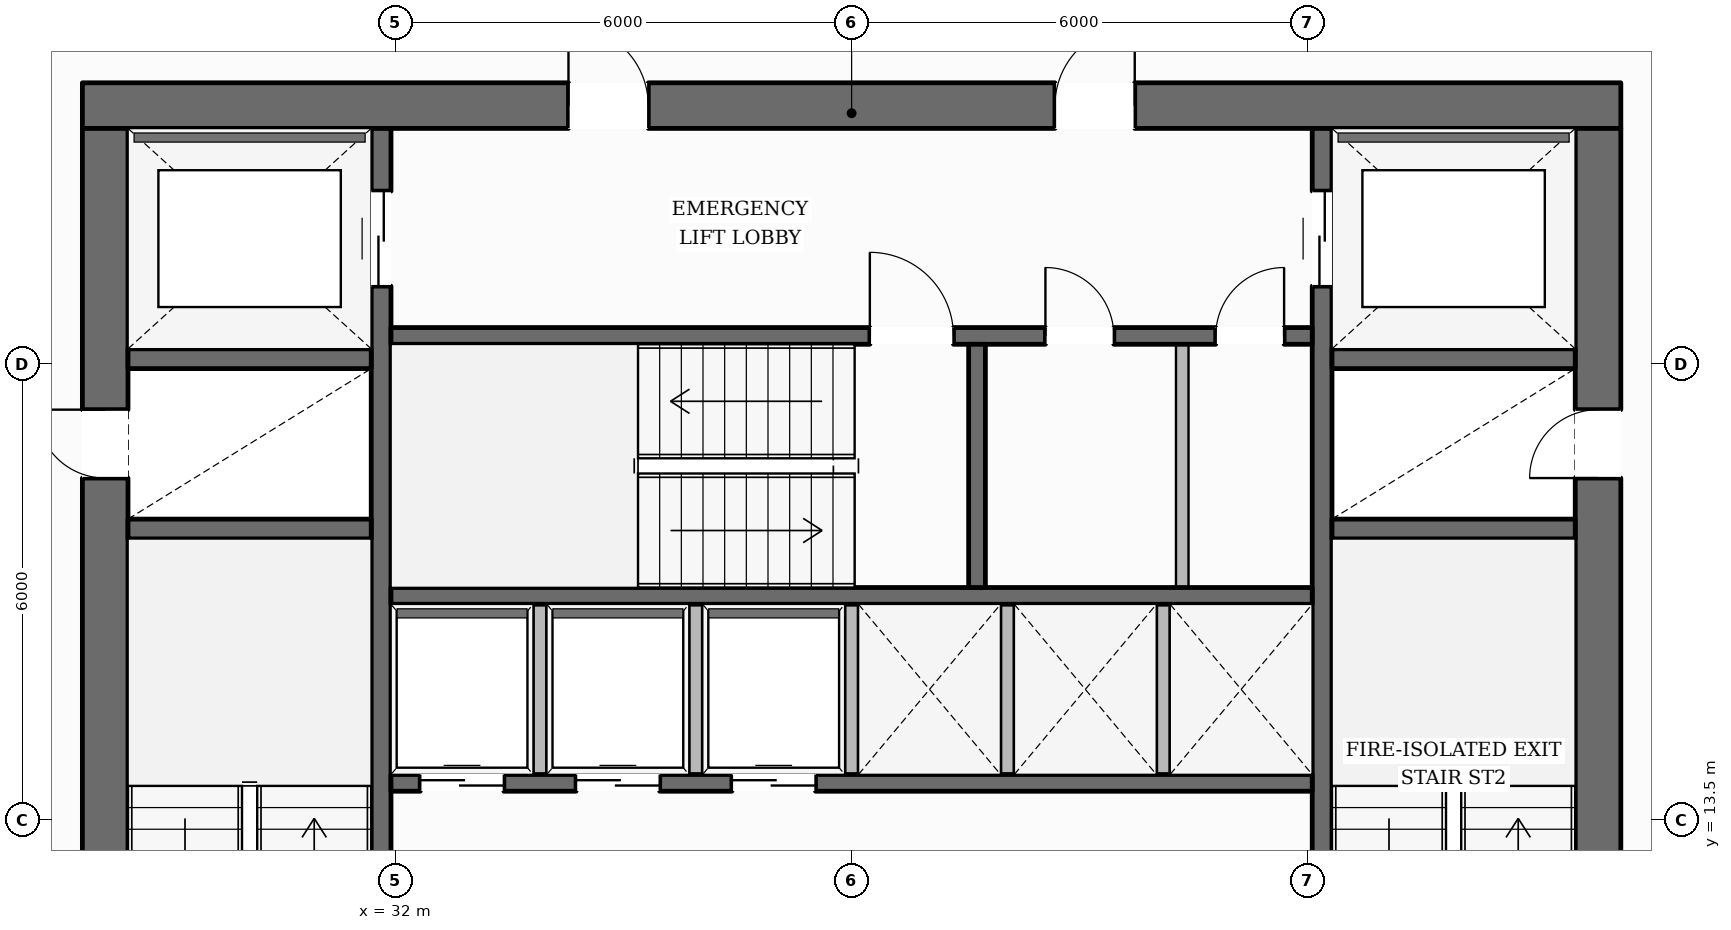
"""IFC4 building model, lengths in metres.
Left out: names, types, materials, properties, quantities, classifications, styles, units other than length and angle.
Written with IfcOpenShell. Run it as: python <this file> out.ifc"""

import sys

from ifc_helpers import new_model, si_unit, direction, frame, frame_2d, origin, place, context, subcontext, project, spatial, rectangle, extrude, element, fill, save


model = new_model("IFC4")
c1 = context("Model", 3, precision=1e-05, world=origin(), true_north=direction((0.0, 1.0)))
c2 = subcontext(c1, "Body", "Model", "MODEL_VIEW")
j1 = project(units=[si_unit("LENGTHUNIT", "METRE"), si_unit("PLANEANGLEUNIT", "RADIAN")], contexts=[c1])
p1 = place(None, origin())
s1 = spatial("IfcSite", under=j1, at=p1, CompositionType="ELEMENT")
p2 = place(p1, origin())
s2 = spatial("IfcBuilding", under=s1, at=p2, CompositionType="ELEMENT")
p3 = place(p2, frame((0.0, 0.0, 52.2)))
s3 = spatial("IfcBuildingStorey", under=s2, at=p3, CompositionType="ELEMENT", Elevation=52.2)
p4 = place(p3, frame((27.88, 22.9, 0.0), z_axis=(0.0, 0.0, 1.0), x_axis=(1.0, 0.0, 0.0)))
e1 = element("IfcWall", 1, at=p4, inside=s3, PredefinedType="SOLIDWALL", context=c2, shape_type="SweptSolid", body=[
    extrude(rectangle(XDim=20.24, YDim=0.6, at=frame_2d((10.12, 0.0))), origin(), (0.0, 0.0, 1.0), 3.59),
])
p5 = place(p4, frame((6.395, 0.0, 0.0)))
e2 = element("IfcOpeningElement", 2, at=p5, cuts=e1, PredefinedType="OPENING", context=c2, shape_type="SweptSolid", body=[
    extrude(rectangle(XDim=1.05, YDim=2.15, at=frame_2d((0.525, 1.075))), frame((0.0, 0.31, 0.0), z_axis=(0.0, -1.0, 0.0), x_axis=(1.0, 0.0, 0.0)), (0.0, 0.0, 1.0), 0.62),
])
p6 = place(p4, frame((12.795, 0.0, 0.0)))
e3 = element("IfcOpeningElement", 3, at=p6, cuts=e1, PredefinedType="OPENING", context=c2, shape_type="SweptSolid", body=[
    extrude(rectangle(XDim=1.05, YDim=2.15, at=frame_2d((0.525, 1.075))), frame((0.0, 0.31, 0.0), z_axis=(0.0, -1.0, 0.0), x_axis=(1.0, 0.0, 0.0)), (0.0, 0.0, 1.0), 0.62),
])
p7 = place(p3, frame((28.18, 9.6, 0.0), z_axis=(0.0, 0.0, 1.0), x_axis=(0.0, 1.0, 0.0)))
e4 = element("IfcWall", 4, at=p7, inside=s3, PredefinedType="SOLIDWALL", context=c2, shape_type="SweptSolid", body=[
    extrude(rectangle(XDim=13.0, YDim=0.6, at=frame_2d((6.5, 0.0))), origin(), (0.0, 0.0, 1.0), 3.59),
])
p8 = place(p7, frame((0.2, 0.0, 0.0)))
e5 = element("IfcOpeningElement", 5, at=p8, cuts=e4, PredefinedType="OPENING", context=c2, shape_type="SweptSolid", body=[
    extrude(rectangle(XDim=1.1, YDim=2.15, at=frame_2d((0.55, 1.075))), frame((0.0, 0.31, 0.0), z_axis=(0.0, -1.0, 0.0), x_axis=(1.0, 0.0, 0.0)), (0.0, 0.0, 1.0), 0.62),
])
p9 = place(p7, frame((8.4, 0.0, 0.0)))
e6 = element("IfcOpeningElement", 6, at=p9, cuts=e4, PredefinedType="OPENING", context=c2, shape_type="SweptSolid", body=[
    extrude(rectangle(XDim=0.9, YDim=2.1, at=frame_2d((0.45, 1.05))), frame((0.0, 0.31, 0.0), z_axis=(0.0, -1.0, 0.0), x_axis=(1.0, 0.0, 0.0)), (0.0, 0.0, 1.0), 0.62),
])
p10 = place(p3, frame((47.82, 9.6, 0.0), z_axis=(0.0, 0.0, 1.0), x_axis=(0.0, 1.0, 0.0)))
e7 = element("IfcWall", 7, at=p10, inside=s3, PredefinedType="SOLIDWALL", context=c2, shape_type="SweptSolid", body=[
    extrude(rectangle(XDim=13.0, YDim=0.6, at=frame_2d((6.5, 0.0))), origin(), (0.0, 0.0, 1.0), 3.59),
])
p11 = place(p10, frame((0.2, 0.0, 0.0)))
e8 = element("IfcOpeningElement", 8, at=p11, cuts=e7, PredefinedType="OPENING", context=c2, shape_type="SweptSolid", body=[
    extrude(rectangle(XDim=1.1, YDim=2.15, at=frame_2d((0.55, 1.075))), frame((0.0, 0.31, 0.0), z_axis=(0.0, -1.0, 0.0), x_axis=(1.0, 0.0, 0.0)), (0.0, 0.0, 1.0), 0.62),
])
p12 = place(p10, frame((8.4, 0.0, 0.0)))
e9 = element("IfcOpeningElement", 9, at=p12, cuts=e7, PredefinedType="OPENING", context=c2, shape_type="SweptSolid", body=[
    extrude(rectangle(XDim=0.9, YDim=2.1, at=frame_2d((0.45, 1.05))), frame((0.0, 0.31, 0.0), z_axis=(0.0, -1.0, 0.0), x_axis=(1.0, 0.0, 0.0)), (0.0, 0.0, 1.0), 0.62),
])
p13 = place(p3, frame((31.81, 9.6, 0.0), z_axis=(0.0, 0.0, 1.0), x_axis=(0.0, 1.0, 0.0)))
e10 = element("IfcWall", 10, at=p13, inside=s3, PredefinedType="SHEAR", context=c2, shape_type="SweptSolid", body=[
    extrude(rectangle(XDim=13.0, YDim=0.26, at=frame_2d((6.5, 0.0))), origin(), (0.0, 0.0, 1.0), 3.59),
])
p14 = place(p13, frame((10.925, 0.0, 0.0)))
e11 = element("IfcOpeningElement", 11, at=p14, cuts=e10, PredefinedType="OPENING", context=c2, shape_type="SweptSolid", body=[
    extrude(rectangle(XDim=1.25, YDim=2.25, at=frame_2d((0.625, 1.125))), frame((0.0, 0.14, 0.0), z_axis=(0.0, -1.0, 0.0), x_axis=(1.0, 0.0, 0.0)), (0.0, 0.0, 1.0), 0.28),
])
p15 = place(p3, frame((44.19, 9.6, 0.0), z_axis=(0.0, 0.0, 1.0), x_axis=(0.0, 1.0, 0.0)))
e12 = element("IfcWall", 12, at=p15, inside=s3, PredefinedType="SHEAR", context=c2, shape_type="SweptSolid", body=[
    extrude(rectangle(XDim=13.0, YDim=0.26, at=frame_2d((6.5, 0.0))), origin(), (0.0, 0.0, 1.0), 3.59),
])
p16 = place(p15, frame((10.925, 0.0, 0.0)))
e13 = element("IfcOpeningElement", 13, at=p16, cuts=e12, PredefinedType="OPENING", context=c2, shape_type="SweptSolid", body=[
    extrude(rectangle(XDim=1.25, YDim=2.25, at=frame_2d((0.625, 1.125))), frame((0.0, 0.14, 0.0), z_axis=(0.0, -1.0, 0.0), x_axis=(1.0, 0.0, 0.0)), (0.0, 0.0, 1.0), 0.28),
])
for number, where, z_axis, x_axis in (
    (14, (28.48, 17.33, 0.0), (0.0, 0.0, 1.0), (1.0, 0.0, 0.0)),
    (15, (28.48, 19.57, 0.0), (0.0, 0.0, 1.0), (1.0, 0.0, 0.0)),
    (16, (44.32, 17.33, 0.0), (0.0, 0.0, 1.0), (1.0, 0.0, 0.0)),
    (17, (44.32, 19.57, 0.0), (0.0, 0.0, 1.0), (1.0, 0.0, 0.0)),
):
    element("IfcWall", number, at=place(p3, frame(where, z_axis=z_axis, x_axis=x_axis)), inside=s3, PredefinedType="SHEAR", context=c2, shape_type="SweptSolid", body=[
        extrude(rectangle(XDim=3.2, YDim=0.26, at=frame_2d((1.6, 0.0))), origin(), (0.0, 0.0, 1.0), 3.59),
    ])
p17 = place(p3, frame((31.94, 19.87, 0.0), z_axis=(0.0, 0.0, 1.0), x_axis=(1.0, 0.0, 0.0)))
e18 = element("IfcWall", 18, at=p17, inside=s3, PredefinedType="SOLIDWALL", context=c2, shape_type="SweptSolid", body=[
    extrude(rectangle(XDim=12.12, YDim=0.22, at=frame_2d((6.06, 0.0))), origin(), (0.0, 0.0, 1.0), 3.59),
])
p18 = place(p17, frame((6.3, 0.0, 0.0)))
e19 = element("IfcOpeningElement", 19, at=p18, cuts=e18, PredefinedType="OPENING", context=c2, shape_type="SweptSolid", body=[
    extrude(rectangle(XDim=1.1, YDim=2.15, at=frame_2d((0.55, 1.075))), frame((0.0, 0.12, 0.0), z_axis=(0.0, -1.0, 0.0), x_axis=(1.0, 0.0, 0.0)), (0.0, 0.0, 1.0), 0.24),
])
p19 = place(p17, frame((8.61, 0.0, 0.0)))
e20 = element("IfcOpeningElement", 20, at=p19, cuts=e18, PredefinedType="OPENING", context=c2, shape_type="SweptSolid", body=[
    extrude(rectangle(XDim=0.9, YDim=2.1, at=frame_2d((0.45, 1.05))), frame((0.0, 0.12, 0.0), z_axis=(0.0, -1.0, 0.0), x_axis=(1.0, 0.0, 0.0)), (0.0, 0.0, 1.0), 0.24),
])
p20 = place(p17, frame((10.85, 0.0, 0.0)))
e21 = element("IfcOpeningElement", 21, at=p20, cuts=e18, PredefinedType="OPENING", context=c2, shape_type="SweptSolid", body=[
    extrude(rectangle(XDim=0.9, YDim=2.1, at=frame_2d((0.45, 1.05))), frame((0.0, 0.12, 0.0), z_axis=(0.0, -1.0, 0.0), x_axis=(1.0, 0.0, 0.0)), (0.0, 0.0, 1.0), 0.24),
])
p21 = place(p3, frame((31.94, 16.45, 0.0), z_axis=(0.0, 0.0, 1.0), x_axis=(1.0, 0.0, 0.0)))
e22 = element("IfcWall", 22, at=p21, inside=s3, PredefinedType="SOLIDWALL", context=c2, shape_type="SweptSolid", body=[
    extrude(rectangle(XDim=12.12, YDim=0.22, at=frame_2d((6.06, 0.0))), origin(), (0.0, 0.0, 1.0), 3.59),
])
p22 = place(p3, frame((39.65, 16.56, 0.0), z_axis=(0.0, 0.0, 1.0), x_axis=(0.0, 1.0, 0.0)))
e23 = element("IfcWall", 23, at=p22, inside=s3, PredefinedType="SOLIDWALL", context=c2, shape_type="SweptSolid", body=[
    extrude(rectangle(XDim=3.2, YDim=0.22, at=frame_2d((1.6, 0.0))), origin(), (0.0, 0.0, 1.0), 3.59),
])
p23 = place(p3, frame((31.94, 13.99, 0.0), z_axis=(0.0, 0.0, 1.0), x_axis=(1.0, 0.0, 0.0)))
e24 = element("IfcWall", 24, at=p23, inside=s3, PredefinedType="SOLIDWALL", context=c2, shape_type="SweptSolid", body=[
    extrude(rectangle(XDim=12.12, YDim=0.22, at=frame_2d((6.06, 0.0))), origin(), (0.0, 0.0, 1.0), 3.59),
])
p24 = place(p23, frame((0.385, 0.0, 0.0)))
e25 = element("IfcOpeningElement", 25, at=p24, cuts=e24, PredefinedType="OPENING", context=c2, shape_type="SweptSolid", body=[
    extrude(rectangle(XDim=1.1, YDim=2.2, at=frame_2d((0.55, 1.1))), frame((0.0, 0.12, 0.0), z_axis=(0.0, -1.0, 0.0), x_axis=(1.0, 0.0, 0.0)), (0.0, 0.0, 1.0), 0.24),
])
p25 = place(p23, frame((2.435, 0.0, 0.0)))
e26 = element("IfcOpeningElement", 26, at=p25, cuts=e24, PredefinedType="OPENING", context=c2, shape_type="SweptSolid", body=[
    extrude(rectangle(XDim=1.1, YDim=2.2, at=frame_2d((0.55, 1.1))), frame((0.0, 0.12, 0.0), z_axis=(0.0, -1.0, 0.0), x_axis=(1.0, 0.0, 0.0)), (0.0, 0.0, 1.0), 0.24),
])
p26 = place(p23, frame((4.485, 0.0, 0.0)))
e27 = element("IfcOpeningElement", 27, at=p26, cuts=e24, PredefinedType="OPENING", context=c2, shape_type="SweptSolid", body=[
    extrude(rectangle(XDim=1.1, YDim=2.2, at=frame_2d((0.55, 1.1))), frame((0.0, 0.12, 0.0), z_axis=(0.0, -1.0, 0.0), x_axis=(1.0, 0.0, 0.0)), (0.0, 0.0, 1.0), 0.24),
])
p27 = place(p3, frame((13.02, 14.028, 0.0), z_axis=(0.0, 0.0, 1.0), x_axis=(0.501385664719, 0.86522391045, 0.0)))
e28 = element("IfcWall", 28, at=p27, inside=s3, PredefinedType="STANDARD", context=c2, shape_type="SweptSolid", body=[
    extrude(rectangle(XDim=35.142, YDim=0.38, at=frame_2d((17.571, 0.0))), origin(), (0.0, 0.0, 1.0), 2.97),
])
p28 = place(p27, frame((30.991, 0.0, 0.65)))
e29 = element("IfcOpeningElement", 29, at=p28, cuts=e28, PredefinedType="OPENING", context=c2, shape_type="SweptSolid", body=[
    extrude(rectangle(XDim=1.65, YDim=1.75, at=frame_2d((0.825, 0.875))), frame((0.0, 0.2, 0.0), z_axis=(0.0, -1.0, 0.0), x_axis=(1.0, 0.0, 0.0)), (0.0, 0.0, 1.0), 0.4),
])
p29 = place(p27, frame((25.293, 0.0, 0.65)))
e30 = element("IfcOpeningElement", 30, at=p29, cuts=e28, PredefinedType="OPENING", context=c2, shape_type="SweptSolid", body=[
    extrude(rectangle(XDim=1.65, YDim=1.75, at=frame_2d((0.825, 0.875))), frame((0.0, 0.2, 0.0), z_axis=(0.0, -1.0, 0.0), x_axis=(1.0, 0.0, 0.0)), (0.0, 0.0, 1.0), 0.4),
])
p30 = place(p27, frame((13.898, 0.0, 0.65)))
e31 = element("IfcOpeningElement", 31, at=p30, cuts=e28, PredefinedType="OPENING", context=c2, shape_type="SweptSolid", body=[
    extrude(rectangle(XDim=1.65, YDim=1.75, at=frame_2d((0.825, 0.875))), frame((0.0, 0.2, 0.0), z_axis=(0.0, -1.0, 0.0), x_axis=(1.0, 0.0, 0.0)), (0.0, 0.0, 1.0), 0.4),
])
p31 = place(p27, frame((8.201, 0.0, 0.65)))
e32 = element("IfcOpeningElement", 32, at=p31, cuts=e28, PredefinedType="OPENING", context=c2, shape_type="SweptSolid", body=[
    extrude(rectangle(XDim=1.65, YDim=1.75, at=frame_2d((0.825, 0.875))), frame((0.0, 0.2, 0.0), z_axis=(0.0, -1.0, 0.0), x_axis=(1.0, 0.0, 0.0)), (0.0, 0.0, 1.0), 0.4),
])
p32 = place(p27, frame((2.503, 0.0, 0.65)))
e33 = element("IfcOpeningElement", 33, at=p32, cuts=e28, PredefinedType="OPENING", context=c2, shape_type="SweptSolid", body=[
    extrude(rectangle(XDim=1.65, YDim=1.75, at=frame_2d((0.825, 0.875))), frame((0.0, 0.2, 0.0), z_axis=(0.0, -1.0, 0.0), x_axis=(1.0, 0.0, 0.0)), (0.0, 0.0, 1.0), 0.4),
])
p33 = place(p3, frame((45.475, 44.367, 0.0), z_axis=(0.0, 0.0, 1.0), x_axis=(0.505110430219, -0.863054722068, 0.0)))
e34 = element("IfcWall", 34, at=p33, inside=s3, PredefinedType="STANDARD", context=c2, shape_type="SweptSolid", body=[
    extrude(rectangle(XDim=35.405, YDim=0.38, at=frame_2d((17.703, 0.0))), origin(), (0.0, 0.0, 1.0), 2.97),
])
p34 = place(p33, frame((31.23, 0.0, 0.65)))
e35 = element("IfcOpeningElement", 35, at=p34, cuts=e34, PredefinedType="OPENING", context=c2, shape_type="SweptSolid", body=[
    extrude(rectangle(XDim=1.65, YDim=1.75, at=frame_2d((0.825, 0.875))), frame((0.0, 0.2, 0.0), z_axis=(0.0, -1.0, 0.0), x_axis=(1.0, 0.0, 0.0)), (0.0, 0.0, 1.0), 0.4),
])
p35 = place(p33, frame((25.488, 0.0, 0.65)))
e36 = element("IfcOpeningElement", 36, at=p35, cuts=e34, PredefinedType="OPENING", context=c2, shape_type="SweptSolid", body=[
    extrude(rectangle(XDim=1.65, YDim=1.75, at=frame_2d((0.825, 0.875))), frame((0.0, 0.2, 0.0), z_axis=(0.0, -1.0, 0.0), x_axis=(1.0, 0.0, 0.0)), (0.0, 0.0, 1.0), 0.4),
])
p36 = place(p33, frame((14.004, 0.0, 0.65)))
e37 = element("IfcOpeningElement", 37, at=p36, cuts=e34, PredefinedType="OPENING", context=c2, shape_type="SweptSolid", body=[
    extrude(rectangle(XDim=1.65, YDim=1.75, at=frame_2d((0.825, 0.875))), frame((0.0, 0.2, 0.0), z_axis=(0.0, -1.0, 0.0), x_axis=(1.0, 0.0, 0.0)), (0.0, 0.0, 1.0), 0.4),
])
p37 = place(p33, frame((8.262, 0.0, 0.65)))
e38 = element("IfcOpeningElement", 38, at=p37, cuts=e34, PredefinedType="OPENING", context=c2, shape_type="SweptSolid", body=[
    extrude(rectangle(XDim=1.65, YDim=1.75, at=frame_2d((0.825, 0.875))), frame((0.0, 0.2, 0.0), z_axis=(0.0, -1.0, 0.0), x_axis=(1.0, 0.0, 0.0)), (0.0, 0.0, 1.0), 0.4),
])
p38 = place(p33, frame((2.52, 0.0, 0.65)))
e39 = element("IfcOpeningElement", 39, at=p38, cuts=e34, PredefinedType="OPENING", context=c2, shape_type="SweptSolid", body=[
    extrude(rectangle(XDim=1.65, YDim=1.75, at=frame_2d((0.825, 0.875))), frame((0.0, 0.2, 0.0), z_axis=(0.0, -1.0, 0.0), x_axis=(1.0, 0.0, 0.0)), (0.0, 0.0, 1.0), 0.4),
])
for number, where, z_axis, x_axis in (
    (40, (33.9, 14.1, 0.0), (0.0, 0.0, 1.0), (0.0, 1.0, 0.0)),
    (41, (35.95, 14.1, 0.0), (0.0, 0.0, 1.0), (0.0, 1.0, 0.0)),
    (42, (38.0, 14.1, 0.0), (0.0, 0.0, 1.0), (0.0, 1.0, 0.0)),
    (43, (40.05, 14.1, 0.0), (0.0, 0.0, 1.0), (0.0, 1.0, 0.0)),
    (44, (42.1, 14.1, 0.0), (0.0, 0.0, 1.0), (0.0, 1.0, 0.0)),
):
    element("IfcWall", number, at=place(p3, frame(where, z_axis=z_axis, x_axis=x_axis)), inside=s3, PredefinedType="PARTITIONING", context=c2, shape_type="SweptSolid", body=[
        extrude(rectangle(XDim=2.24, YDim=0.165, at=frame_2d((1.12, 0.0))), origin(), (0.0, 0.0, 1.0), 3.59),
    ])
p39 = place(p3, frame((42.35, 16.56, 0.0), z_axis=(0.0, 0.0, 1.0), x_axis=(0.0, 1.0, 0.0)))
e45 = element("IfcWall", 45, at=p39, inside=s3, PredefinedType="PARTITIONING", context=c2, shape_type="SweptSolid", body=[
    extrude(rectangle(XDim=3.2, YDim=0.165, at=frame_2d((1.6, 0.0))), origin(), (0.0, 0.0, 1.0), 3.59),
])
p40 = place(p18, origin())
e46 = element("IfcDoor", 46, at=p40, inside=s3, OperationType="SINGLE_SWING_LEFT", PredefinedType="DOOR", context=c2, shape_type="SweptSolid", body=[
    extrude(rectangle(XDim=1.1, YDim=2.15, at=frame_2d((0.55, 1.075))), frame((0.0, 0.025, 0.0), z_axis=(0.0, -1.0, 0.0), x_axis=(1.0, 0.0, 0.0)), (0.0, 0.0, 1.0), 0.05),
])
fill(e19, e46)
p41 = place(p9, origin())
e47 = element("IfcDoor", 47, at=p41, inside=s3, OperationType="SINGLE_SWING_RIGHT", PredefinedType="DOOR", context=c2, shape_type="SweptSolid", body=[
    extrude(rectangle(XDim=0.9, YDim=2.1, at=frame_2d((0.45, 1.05))), frame((0.0, 0.025, 0.0), z_axis=(0.0, -1.0, 0.0), x_axis=(1.0, 0.0, 0.0)), (0.0, 0.0, 1.0), 0.05),
])
fill(e6, e47)
p42 = place(p12, origin())
e48 = element("IfcDoor", 48, at=p42, inside=s3, OperationType="SINGLE_SWING_LEFT", PredefinedType="DOOR", context=c2, shape_type="SweptSolid", body=[
    extrude(rectangle(XDim=0.9, YDim=2.1, at=frame_2d((0.45, 1.05))), frame((0.0, 0.025, 0.0), z_axis=(0.0, -1.0, 0.0), x_axis=(1.0, 0.0, 0.0)), (0.0, 0.0, 1.0), 0.05),
])
fill(e9, e48)
p43 = place(p5, origin())
e49 = element("IfcDoor", 49, at=p43, inside=s3, OperationType="SINGLE_SWING_LEFT", PredefinedType="DOOR", context=c2, shape_type="SweptSolid", body=[
    extrude(rectangle(XDim=1.05, YDim=2.15, at=frame_2d((0.525, 1.075))), frame((0.0, 0.025, 0.0), z_axis=(0.0, -1.0, 0.0), x_axis=(1.0, 0.0, 0.0)), (0.0, 0.0, 1.0), 0.05),
])
fill(e2, e49)
p44 = place(p6, origin())
e50 = element("IfcDoor", 50, at=p44, inside=s3, OperationType="SINGLE_SWING_RIGHT", PredefinedType="DOOR", context=c2, shape_type="SweptSolid", body=[
    extrude(rectangle(XDim=1.05, YDim=2.15, at=frame_2d((0.525, 1.075))), frame((0.0, 0.025, 0.0), z_axis=(0.0, -1.0, 0.0), x_axis=(1.0, 0.0, 0.0)), (0.0, 0.0, 1.0), 0.05),
])
fill(e3, e50)
p45 = place(p14, origin())
e51 = element("IfcDoor", 51, at=p45, inside=s3, OperationType="DOUBLE_DOOR_SLIDING", PredefinedType="DOOR", context=c2, shape_type="SweptSolid", body=[
    extrude(rectangle(XDim=1.25, YDim=2.25, at=frame_2d((0.625, 1.125))), frame((0.0, 0.025, 0.0), z_axis=(0.0, -1.0, 0.0), x_axis=(1.0, 0.0, 0.0)), (0.0, 0.0, 1.0), 0.05),
])
fill(e11, e51)
p46 = place(p16, origin())
e52 = element("IfcDoor", 52, at=p46, inside=s3, OperationType="DOUBLE_DOOR_SLIDING", PredefinedType="DOOR", context=c2, shape_type="SweptSolid", body=[
    extrude(rectangle(XDim=1.25, YDim=2.25, at=frame_2d((0.625, 1.125))), frame((0.0, 0.025, 0.0), z_axis=(0.0, -1.0, 0.0), x_axis=(1.0, 0.0, 0.0)), (0.0, 0.0, 1.0), 0.05),
])
fill(e13, e52)
p47 = place(p24, origin())
e53 = element("IfcDoor", 53, at=p47, inside=s3, OperationType="DOUBLE_DOOR_SLIDING", PredefinedType="DOOR", context=c2, shape_type="SweptSolid", body=[
    extrude(rectangle(XDim=1.1, YDim=2.2, at=frame_2d((0.55, 1.1))), frame((0.0, 0.025, 0.0), z_axis=(0.0, -1.0, 0.0), x_axis=(1.0, 0.0, 0.0)), (0.0, 0.0, 1.0), 0.05),
])
fill(e25, e53)
p48 = place(p25, origin())
e54 = element("IfcDoor", 54, at=p48, inside=s3, OperationType="DOUBLE_DOOR_SLIDING", PredefinedType="DOOR", context=c2, shape_type="SweptSolid", body=[
    extrude(rectangle(XDim=1.1, YDim=2.2, at=frame_2d((0.55, 1.1))), frame((0.0, 0.025, 0.0), z_axis=(0.0, -1.0, 0.0), x_axis=(1.0, 0.0, 0.0)), (0.0, 0.0, 1.0), 0.05),
])
fill(e26, e54)
p49 = place(p26, origin())
e55 = element("IfcDoor", 55, at=p49, inside=s3, OperationType="DOUBLE_DOOR_SLIDING", PredefinedType="DOOR", context=c2, shape_type="SweptSolid", body=[
    extrude(rectangle(XDim=1.1, YDim=2.2, at=frame_2d((0.55, 1.1))), frame((0.0, 0.025, 0.0), z_axis=(0.0, -1.0, 0.0), x_axis=(1.0, 0.0, 0.0)), (0.0, 0.0, 1.0), 0.05),
])
fill(e27, e55)
p50 = place(p19, origin())
e56 = element("IfcDoor", 56, at=p50, inside=s3, OperationType="SINGLE_SWING_LEFT", PredefinedType="DOOR", context=c2, shape_type="SweptSolid", body=[
    extrude(rectangle(XDim=0.9, YDim=2.1, at=frame_2d((0.45, 1.05))), frame((0.0, 0.025, 0.0), z_axis=(0.0, -1.0, 0.0), x_axis=(1.0, 0.0, 0.0)), (0.0, 0.0, 1.0), 0.05),
])
fill(e20, e56)
p51 = place(p20, origin())
e57 = element("IfcDoor", 57, at=p51, inside=s3, OperationType="SINGLE_SWING_RIGHT", PredefinedType="DOOR", context=c2, shape_type="SweptSolid", body=[
    extrude(rectangle(XDim=0.9, YDim=2.1, at=frame_2d((0.45, 1.05))), frame((0.0, 0.025, 0.0), z_axis=(0.0, -1.0, 0.0), x_axis=(1.0, 0.0, 0.0)), (0.0, 0.0, 1.0), 0.05),
])
fill(e21, e57)
save(model, sys.argv[1])
